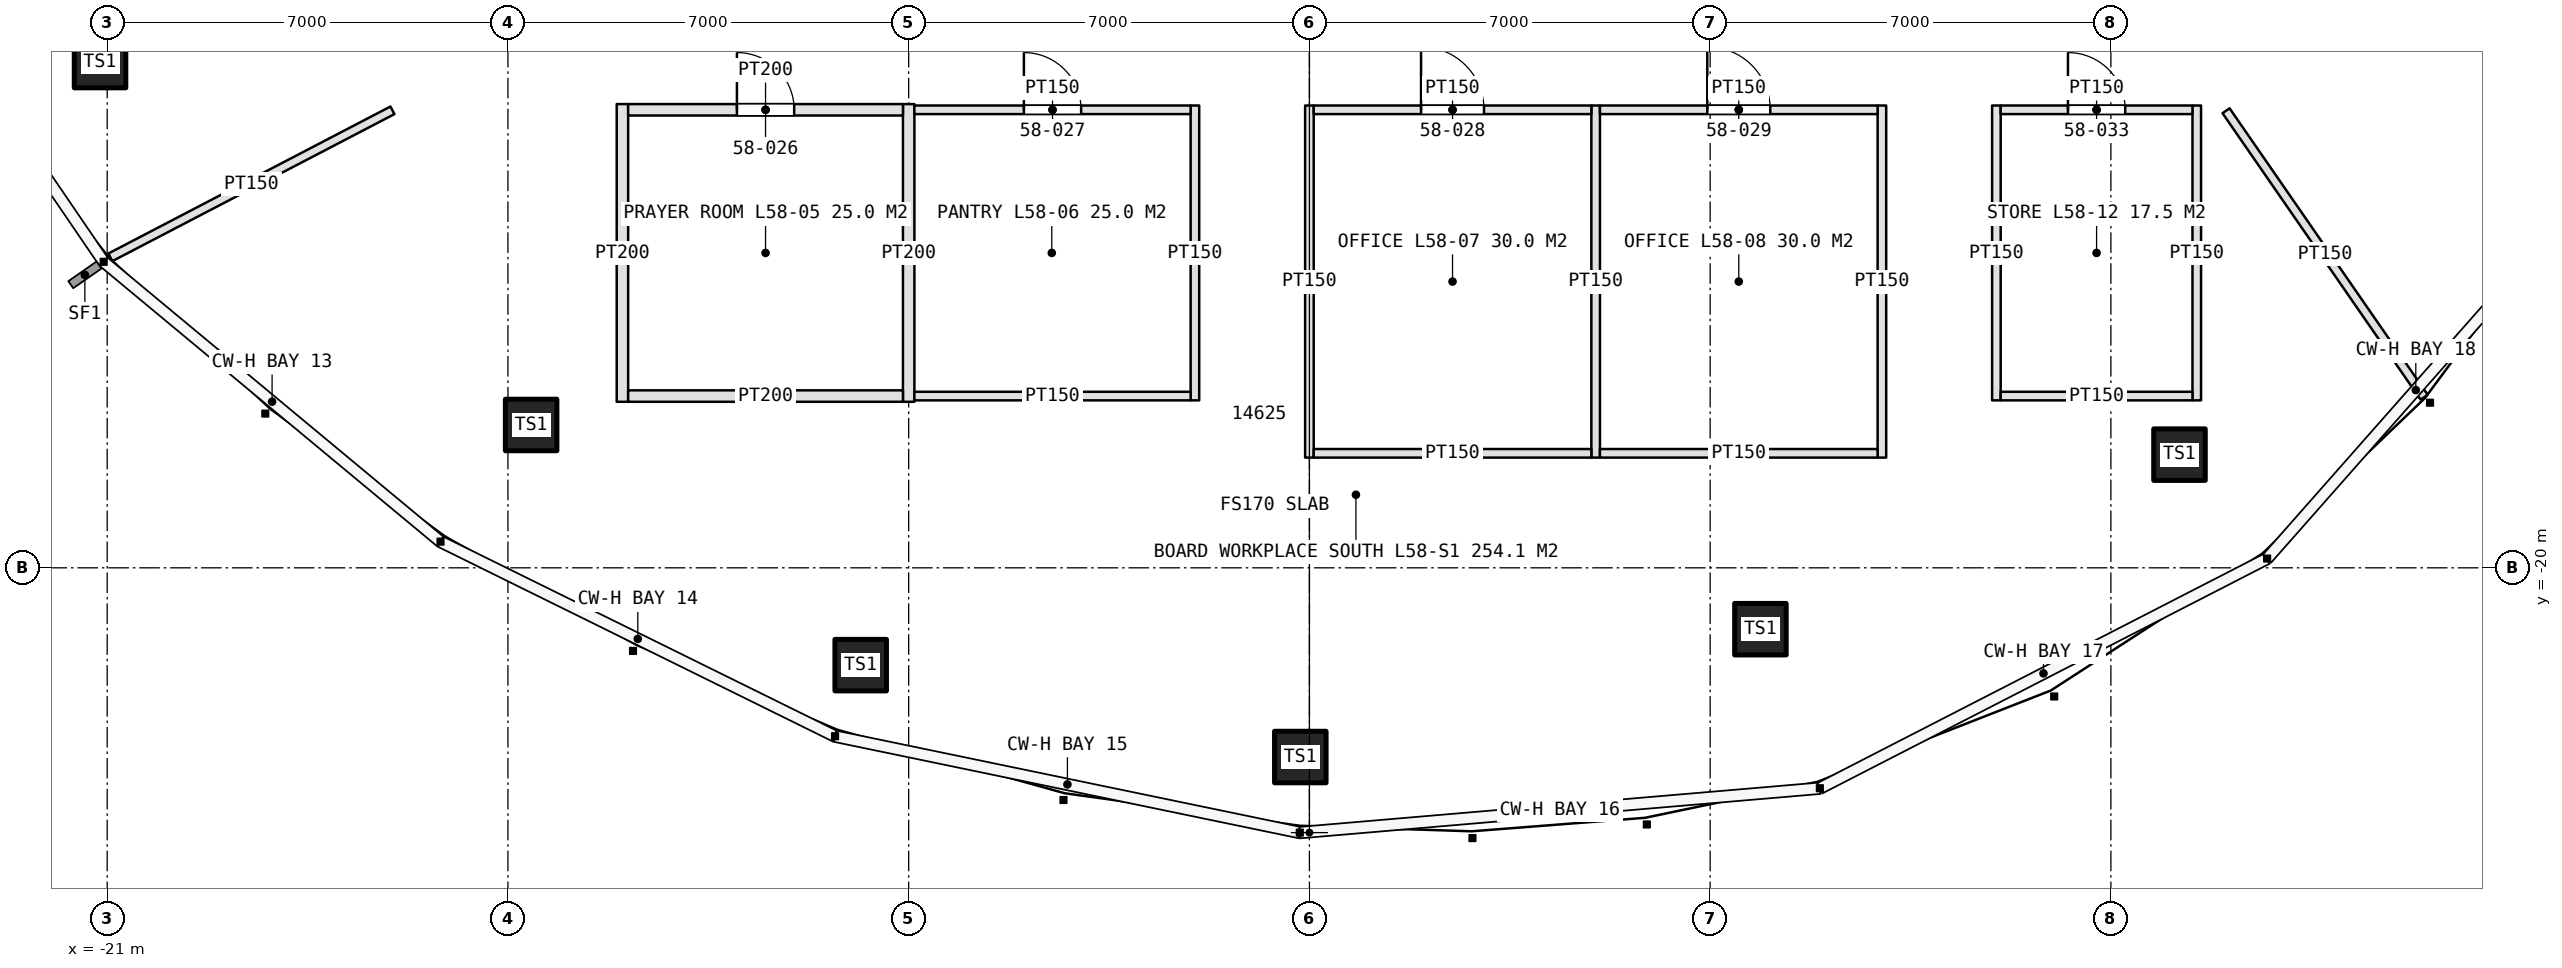
"""IFC4 building model, lengths in metres.
Left out: names, types, materials, properties, quantities, classifications, styles, units other than length and angle.
Written with IfcOpenShell. Run it as: python <this file> out.ifc"""

import sys

from ifc_helpers import new_model, si_unit, direction, frame, frame_2d, origin, origin_2d, place, context, subcontext, project, spatial, rectangle, hollow_rectangle, extrude, element, fill, save


model = new_model("IFC4")
c1 = context("Model", 3, precision=1e-05, world=origin(), true_north=direction((0.0, 1.0)))
c2 = subcontext(c1, "Body", "Model", "MODEL_VIEW")
j1 = project(units=[si_unit("LENGTHUNIT", "METRE"), si_unit("PLANEANGLEUNIT", "RADIAN")], contexts=[c1])
p1 = place(None, origin())
s1 = spatial("IfcSite", under=j1, at=p1, CompositionType="ELEMENT")
p2 = place(p1, origin())
s2 = spatial("IfcBuilding", under=s1, at=p2, CompositionType="ELEMENT")
p3 = place(p2, frame((0.0, 0.0, 262.0)))
s3 = spatial("IfcBuildingStorey", under=s2, at=p3, CompositionType="ELEMENT", Elevation=262.0)
for number, where, z_axis, x_axis in (
    (1, (-21.125, -11.166, 0.0), (0.0, 0.0, 1.0), (1.0, 0.0, 0.0)),
    (2, (-13.595, -17.505, 0.0), (0.0, 0.0, 1.0), (1.0, 0.0, 0.0)),
):
    element("IfcColumn", number, at=place(p3, frame(where, z_axis=z_axis, x_axis=x_axis)), inside=s3, PredefinedType="COLUMN", context=c2, shape_type="SweptSolid", body=[
        extrude(hollow_rectangle(XDim=0.9, YDim=0.9, WallThickness=0.08, at=origin_2d()), origin(), (0.0, 0.0, 1.0), 4.2),
    ])
for number, where, z_axis, x_axis in (
    (3, (-7.838, -21.7, 0.0), (0.0, 0.0, 1.0), (1.0, 0.0, 0.0)),
    (4, (-0.159, -23.305, 0.0), (0.0, 0.0, 1.0), (1.0, 0.0, 0.0)),
):
    element("IfcColumn", number, at=place(p3, frame(where, z_axis=z_axis, x_axis=x_axis)), inside=s3, PredefinedType="COLUMN", context=c2, shape_type="SweptSolid", body=[
        extrude(hollow_rectangle(XDim=0.9, YDim=0.9, WallThickness=0.08, at=origin_2d()), origin(), (0.0, 0.0, 1.0), 3.425),
    ])
for number, where, z_axis, x_axis in (
    (5, (7.878, -21.072, 0.0), (0.0, 0.0, 1.0), (1.0, 0.0, 0.0)),
    (6, (15.198, -18.023, 0.0), (0.0, 0.0, 1.0), (1.0, 0.0, 0.0)),
):
    element("IfcColumn", number, at=place(p3, frame(where, z_axis=z_axis, x_axis=x_axis)), inside=s3, PredefinedType="COLUMN", context=c2, shape_type="SweptSolid", body=[
        extrude(hollow_rectangle(XDim=0.9, YDim=0.9, WallThickness=0.08, at=origin_2d()), origin(), (0.0, 0.0, 1.0), 4.2),
    ])
for number, where, z_axis, x_axis in (
    (7, (-12.0, -11.9, 0.0), (0.0, 0.0, 1.0), (0.0, -1.0, 0.0)),
    (8, (-7.0, -11.9, 0.0), (0.0, 0.0, 1.0), (0.0, -1.0, 0.0)),
):
    element("IfcWall", number, at=place(p3, frame(where, z_axis=z_axis, x_axis=x_axis)), inside=s3, PredefinedType="PARTITIONING", context=c2, shape_type="SweptSolid", body=[
        extrude(rectangle(XDim=5.2, YDim=0.2, at=frame_2d((2.6, 0.0))), origin(), (0.0, 0.0, 1.0), 3.0),
    ])
p4 = place(p3, frame((-2.0, -11.925, 0.0), z_axis=(0.0, 0.0, 1.0), x_axis=(0.0, -1.0, 0.0)))
e9 = element("IfcWall", 9, at=p4, inside=s3, PredefinedType="PARTITIONING", context=c2, shape_type="SweptSolid", body=[
    extrude(rectangle(XDim=5.15, YDim=0.15, at=frame_2d((2.575, 0.0))), origin(), (0.0, 0.0, 1.0), 3.0),
])
p5 = place(p3, frame((-11.9, -12.0, 0.0), z_axis=(0.0, 0.0, 1.0), x_axis=(1.0, 0.0, 0.0)))
e10 = element("IfcWall", 10, at=p5, inside=s3, PredefinedType="PARTITIONING", context=c2, shape_type="SweptSolid", body=[
    extrude(rectangle(XDim=4.8, YDim=0.2, at=frame_2d((2.4, 0.0))), origin(), (0.0, 0.0, 1.0), 3.0),
])
p6 = place(p5, frame((1.9, 0.0, 0.0)))
e11 = element("IfcOpeningElement", 11, at=p6, cuts=e10, PredefinedType="OPENING", context=c2, shape_type="SweptSolid", body=[
    extrude(rectangle(XDim=1.0, YDim=2.2, at=frame_2d((0.5, 1.1))), frame((0.0, 0.11, 0.0), z_axis=(0.0, -1.0, 0.0), x_axis=(1.0, 0.0, 0.0)), (0.0, 0.0, 1.0), 0.22),
])
p7 = place(p3, frame((-11.9, -17.0, 0.0), z_axis=(0.0, 0.0, 1.0), x_axis=(1.0, 0.0, 0.0)))
e12 = element("IfcWall", 12, at=p7, inside=s3, PredefinedType="PARTITIONING", context=c2, shape_type="SweptSolid", body=[
    extrude(rectangle(XDim=4.8, YDim=0.2, at=frame_2d((2.4, 0.0))), origin(), (0.0, 0.0, 1.0), 3.0),
])
p8 = place(p3, frame((-6.9, -12.0, 0.0), z_axis=(0.0, 0.0, 1.0), x_axis=(1.0, 0.0, 0.0)))
e13 = element("IfcWall", 13, at=p8, inside=s3, PredefinedType="PARTITIONING", context=c2, shape_type="SweptSolid", body=[
    extrude(rectangle(XDim=4.825, YDim=0.15, at=frame_2d((2.413, 0.0))), origin(), (0.0, 0.0, 1.0), 3.0),
])
p9 = place(p8, frame((1.913, 0.0, 0.0)))
e14 = element("IfcOpeningElement", 14, at=p9, cuts=e13, PredefinedType="OPENING", context=c2, shape_type="SweptSolid", body=[
    extrude(rectangle(XDim=1.0, YDim=2.2, at=frame_2d((0.5, 1.1))), frame((0.0, 0.085, 0.0), z_axis=(0.0, -1.0, 0.0), x_axis=(1.0, 0.0, 0.0)), (0.0, 0.0, 1.0), 0.17),
])
p10 = place(p3, frame((-6.9, -17.0, 0.0), z_axis=(0.0, 0.0, 1.0), x_axis=(1.0, 0.0, 0.0)))
e15 = element("IfcWall", 15, at=p10, inside=s3, PredefinedType="PARTITIONING", context=c2, shape_type="SweptSolid", body=[
    extrude(rectangle(XDim=4.825, YDim=0.15, at=frame_2d((2.413, 0.0))), origin(), (0.0, 0.0, 1.0), 3.0),
])
for number, where, z_axis, x_axis in (
    (16, (0.0, -11.925, 0.0), (0.0, 0.0, 1.0), (0.0, -1.0, 0.0)),
    (17, (5.0, -11.925, 0.0), (0.0, 0.0, 1.0), (0.0, -1.0, 0.0)),
    (18, (10.0, -11.925, 0.0), (0.0, 0.0, 1.0), (0.0, -1.0, 0.0)),
):
    element("IfcWall", number, at=place(p3, frame(where, z_axis=z_axis, x_axis=x_axis)), inside=s3, PredefinedType="PARTITIONING", context=c2, shape_type="SweptSolid", body=[
        extrude(rectangle(XDim=6.15, YDim=0.15, at=frame_2d((3.075, 0.0))), origin(), (0.0, 0.0, 1.0), 3.0),
    ])
p11 = place(p3, frame((0.075, -12.0, 0.0), z_axis=(0.0, 0.0, 1.0), x_axis=(1.0, 0.0, 0.0)))
e19 = element("IfcWall", 19, at=p11, inside=s3, PredefinedType="PARTITIONING", context=c2, shape_type="SweptSolid", body=[
    extrude(rectangle(XDim=4.85, YDim=0.15, at=frame_2d((2.425, 0.0))), origin(), (0.0, 0.0, 1.0), 3.0),
])
p12 = place(p11, frame((1.875, 0.0, 0.0)))
e20 = element("IfcOpeningElement", 20, at=p12, cuts=e19, PredefinedType="OPENING", context=c2, shape_type="SweptSolid", body=[
    extrude(rectangle(XDim=1.1, YDim=2.3, at=frame_2d((0.55, 1.15))), frame((0.0, 0.085, 0.0), z_axis=(0.0, -1.0, 0.0), x_axis=(1.0, 0.0, 0.0)), (0.0, 0.0, 1.0), 0.17),
])
p13 = place(p3, frame((0.075, -18.0, 0.0), z_axis=(0.0, 0.0, 1.0), x_axis=(1.0, 0.0, 0.0)))
e21 = element("IfcWall", 21, at=p13, inside=s3, PredefinedType="PARTITIONING", context=c2, shape_type="SweptSolid", body=[
    extrude(rectangle(XDim=4.85, YDim=0.15, at=frame_2d((2.425, 0.0))), origin(), (0.0, 0.0, 1.0), 3.0),
])
p14 = place(p3, frame((5.075, -12.0, 0.0), z_axis=(0.0, 0.0, 1.0), x_axis=(1.0, 0.0, 0.0)))
e22 = element("IfcWall", 22, at=p14, inside=s3, PredefinedType="PARTITIONING", context=c2, shape_type="SweptSolid", body=[
    extrude(rectangle(XDim=4.85, YDim=0.15, at=frame_2d((2.425, 0.0))), origin(), (0.0, 0.0, 1.0), 3.0),
])
p15 = place(p14, frame((1.875, 0.0, 0.0)))
e23 = element("IfcOpeningElement", 23, at=p15, cuts=e22, PredefinedType="OPENING", context=c2, shape_type="SweptSolid", body=[
    extrude(rectangle(XDim=1.1, YDim=2.3, at=frame_2d((0.55, 1.15))), frame((0.0, 0.085, 0.0), z_axis=(0.0, -1.0, 0.0), x_axis=(1.0, 0.0, 0.0)), (0.0, 0.0, 1.0), 0.17),
])
p16 = place(p3, frame((5.075, -18.0, 0.0), z_axis=(0.0, 0.0, 1.0), x_axis=(1.0, 0.0, 0.0)))
e24 = element("IfcWall", 24, at=p16, inside=s3, PredefinedType="PARTITIONING", context=c2, shape_type="SweptSolid", body=[
    extrude(rectangle(XDim=4.85, YDim=0.15, at=frame_2d((2.425, 0.0))), origin(), (0.0, 0.0, 1.0), 3.0),
])
for number, where, z_axis, x_axis in (
    (25, (12.0, -11.925, 0.0), (0.0, 0.0, 1.0), (0.0, -1.0, 0.0)),
    (26, (15.5, -11.925, 0.0), (0.0, 0.0, 1.0), (0.0, -1.0, 0.0)),
):
    element("IfcWall", number, at=place(p3, frame(where, z_axis=z_axis, x_axis=x_axis)), inside=s3, PredefinedType="PARTITIONING", context=c2, shape_type="SweptSolid", body=[
        extrude(rectangle(XDim=5.15, YDim=0.15, at=frame_2d((2.575, 0.0))), origin(), (0.0, 0.0, 1.0), 3.0),
    ])
p17 = place(p3, frame((12.075, -12.0, 0.0), z_axis=(0.0, 0.0, 1.0), x_axis=(1.0, 0.0, 0.0)))
e27 = element("IfcWall", 27, at=p17, inside=s3, PredefinedType="PARTITIONING", context=c2, shape_type="SweptSolid", body=[
    extrude(rectangle(XDim=3.35, YDim=0.15, at=frame_2d((1.675, 0.0))), origin(), (0.0, 0.0, 1.0), 3.0),
])
p18 = place(p17, frame((1.175, 0.0, 0.0)))
e28 = element("IfcOpeningElement", 28, at=p18, cuts=e27, PredefinedType="OPENING", context=c2, shape_type="SweptSolid", body=[
    extrude(rectangle(XDim=1.0, YDim=2.2, at=frame_2d((0.5, 1.1))), frame((0.0, 0.085, 0.0), z_axis=(0.0, -1.0, 0.0), x_axis=(1.0, 0.0, 0.0)), (0.0, 0.0, 1.0), 0.17),
])
p19 = place(p3, frame((12.075, -17.0, 0.0), z_axis=(0.0, 0.0, 1.0), x_axis=(1.0, 0.0, 0.0)))
e29 = element("IfcWall", 29, at=p19, inside=s3, PredefinedType="PARTITIONING", context=c2, shape_type="SweptSolid", body=[
    extrude(rectangle(XDim=3.35, YDim=0.15, at=frame_2d((1.675, 0.0))), origin(), (0.0, 0.0, 1.0), 3.0),
])
p20 = place(p3, frame((-16.018, -12.009, 0.0), z_axis=(0.0, 0.0, 1.0), x_axis=(-0.886831549241, -0.462092851351, 0.0)))
e30 = element("IfcWall", 30, at=p20, inside=s3, PredefinedType="PARTITIONING", context=c2, shape_type="SweptSolid", body=[
    extrude(rectangle(XDim=5.555, YDim=0.15, at=frame_2d((2.778, 0.0))), origin(), (0.0, 0.0, 1.0), 3.0),
])
p21 = place(p3, frame((16.011, -12.016, 0.0), z_axis=(0.0, 0.0, 1.0), x_axis=(0.568863489071, -0.822431961199, 0.0)))
e31 = element("IfcWall", 31, at=p21, inside=s3, PredefinedType="PARTITIONING", context=c2, shape_type="SweptSolid", body=[
    extrude(rectangle(XDim=6.083, YDim=0.15, at=frame_2d((3.042, 0.0))), origin(), (0.0, 0.0, 1.0), 3.0),
])
p22 = place(p6, origin())
e32 = element("IfcDoor", 32, at=p22, inside=s3, OperationType="SINGLE_SWING_LEFT", PredefinedType="DOOR", context=c2, shape_type="SweptSolid", body=[
    extrude(rectangle(XDim=1.0, YDim=2.2, at=frame_2d((0.5, 1.1))), frame((0.0, 0.025, 0.0), z_axis=(0.0, -1.0, 0.0), x_axis=(1.0, 0.0, 0.0)), (0.0, 0.0, 1.0), 0.05),
])
fill(e11, e32)
p23 = place(p9, origin())
e33 = element("IfcDoor", 33, at=p23, inside=s3, OperationType="SINGLE_SWING_LEFT", PredefinedType="DOOR", context=c2, shape_type="SweptSolid", body=[
    extrude(rectangle(XDim=1.0, YDim=2.2, at=frame_2d((0.5, 1.1))), frame((0.0, 0.025, 0.0), z_axis=(0.0, -1.0, 0.0), x_axis=(1.0, 0.0, 0.0)), (0.0, 0.0, 1.0), 0.05),
])
fill(e14, e33)
p24 = place(p12, origin())
e34 = element("IfcDoor", 34, at=p24, inside=s3, OperationType="SINGLE_SWING_LEFT", PredefinedType="DOOR", context=c2, shape_type="SweptSolid", body=[
    extrude(rectangle(XDim=1.1, YDim=2.3, at=frame_2d((0.55, 1.15))), frame((0.0, 0.025, 0.0), z_axis=(0.0, -1.0, 0.0), x_axis=(1.0, 0.0, 0.0)), (0.0, 0.0, 1.0), 0.05),
])
fill(e20, e34)
p25 = place(p15, origin())
e35 = element("IfcDoor", 35, at=p25, inside=s3, OperationType="SINGLE_SWING_LEFT", PredefinedType="DOOR", context=c2, shape_type="SweptSolid", body=[
    extrude(rectangle(XDim=1.1, YDim=2.3, at=frame_2d((0.55, 1.15))), frame((0.0, 0.025, 0.0), z_axis=(0.0, -1.0, 0.0), x_axis=(1.0, 0.0, 0.0)), (0.0, 0.0, 1.0), 0.05),
])
fill(e23, e35)
p26 = place(p18, origin())
e36 = element("IfcDoor", 36, at=p26, inside=s3, OperationType="SINGLE_SWING_LEFT", PredefinedType="DOOR", context=c2, shape_type="SweptSolid", body=[
    extrude(rectangle(XDim=1.0, YDim=2.2, at=frame_2d((0.5, 1.1))), frame((0.0, 0.025, 0.0), z_axis=(0.0, -1.0, 0.0), x_axis=(1.0, 0.0, 0.0)), (0.0, 0.0, 1.0), 0.05),
])
fill(e28, e36)
save(model, sys.argv[1])
